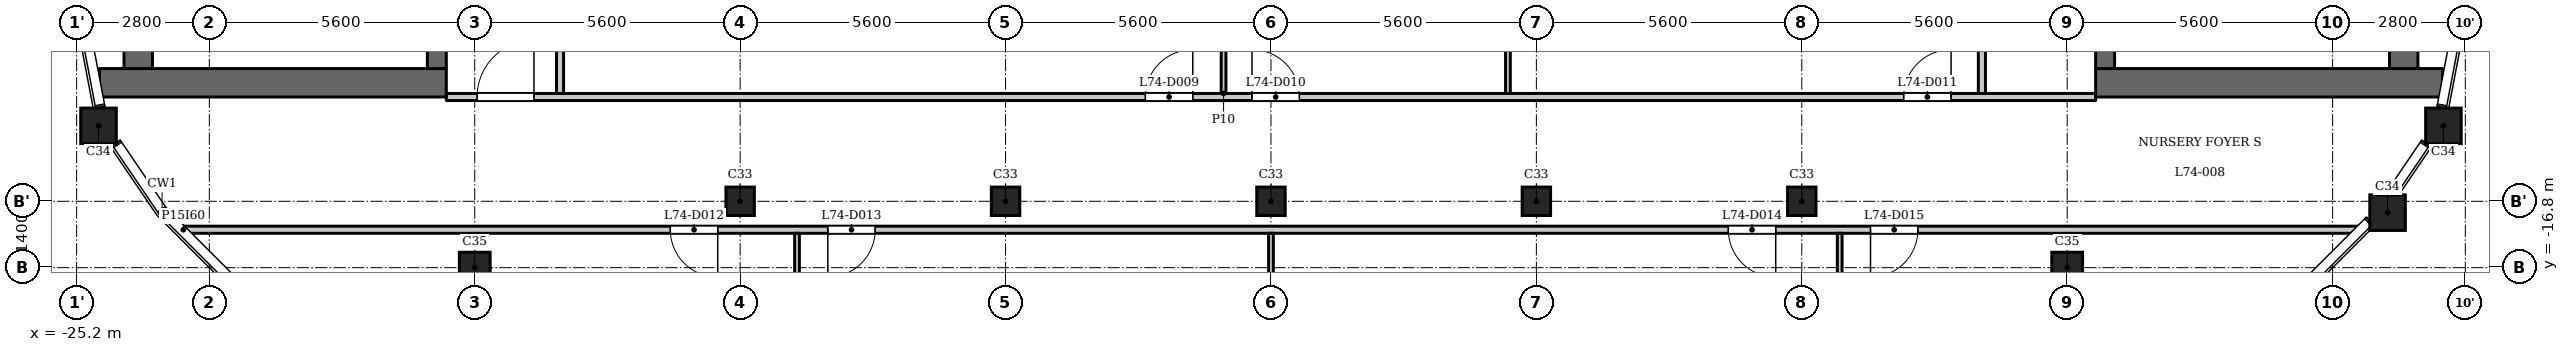
"""IFC4 building model, lengths in metres.
Left out: names, types, materials, properties, quantities, classifications, styles, units other than length and angle.
Written with IfcOpenShell. Run it as: python <this file> out.ifc"""

import sys

from ifc_helpers import new_model, si_unit, direction, frame, frame_2d, origin, origin_2d, place, context, subcontext, project, spatial, rectangle, extrude, element, fill, save


model = new_model("IFC4")
c1 = context("Model", 3, precision=1e-05, world=origin(), true_north=direction((0.0, 1.0)))
c2 = subcontext(c1, "Body", "Model", "MODEL_VIEW")
j1 = project(units=[si_unit("LENGTHUNIT", "METRE"), si_unit("PLANEANGLEUNIT", "RADIAN")], contexts=[c1])
p1 = place(None, origin())
s1 = spatial("IfcSite", under=j1, at=p1, CompositionType="ELEMENT")
p2 = place(p1, origin())
s2 = spatial("IfcBuilding", under=s1, at=p2, CompositionType="ELEMENT")
p3 = place(p2, frame((0.0, 0.0, 283.7)))
s3 = spatial("IfcBuildingStorey", under=s2, at=p3, CompositionType="ELEMENT", Elevation=283.7)
for number, where, z_axis, x_axis in (
    (1, (23.56, -15.64, 0.0), (0.0, 0.0, 1.0), (1.0, 0.0, 0.0)),
    (2, (24.738, -13.809, 0.0), (0.0, 0.0, 1.0), (1.0, 0.0, 0.0)),
    (3, (-24.738, -13.809, 0.0), (0.0, 0.0, 1.0), (1.0, 0.0, 0.0)),
):
    element("IfcColumn", number, at=place(p3, frame(where, z_axis=z_axis, x_axis=x_axis)), inside=s3, PredefinedType="COLUMN", context=c2, shape_type="SweptSolid", body=[
        extrude(rectangle(XDim=0.75, YDim=0.75, at=origin_2d()), origin(), (0.0, 0.0, 1.0), 5.4),
    ])
for number, where, z_axis, x_axis in (
    (4, (-16.8, -16.8, 0.0), (0.0, 0.0, 1.0), (1.0, 0.0, 0.0)),
    (5, (16.8, -16.8, 0.0), (0.0, 0.0, 1.0), (1.0, 0.0, 0.0)),
):
    element("IfcColumn", number, at=place(p3, frame(where, z_axis=z_axis, x_axis=x_axis)), inside=s3, PredefinedType="COLUMN", context=c2, shape_type="SweptSolid", body=[
        extrude(rectangle(XDim=0.65, YDim=0.65, at=origin_2d()), origin(), (0.0, 0.0, 1.0), 5.4),
    ])
for number, where, z_axis, x_axis in (
    (6, (-11.2, -15.4, 0.0), (0.0, 0.0, 1.0), (1.0, 0.0, 0.0)),
    (7, (-5.6, -15.4, 0.0), (0.0, 0.0, 1.0), (1.0, 0.0, 0.0)),
    (8, (0.0, -15.4, 0.0), (0.0, 0.0, 1.0), (1.0, 0.0, 0.0)),
    (9, (5.6, -15.4, 0.0), (0.0, 0.0, 1.0), (1.0, 0.0, 0.0)),
    (10, (11.2, -15.4, 0.0), (0.0, 0.0, 1.0), (1.0, 0.0, 0.0)),
):
    element("IfcColumn", number, at=place(p3, frame(where, z_axis=z_axis, x_axis=x_axis)), inside=s3, PredefinedType="COLUMN", context=c2, shape_type="SweptSolid", body=[
        extrude(rectangle(XDim=0.6, YDim=0.6, at=origin_2d()), origin(), (0.0, 0.0, 1.0), 5.4),
    ])
p4 = place(p3, frame((-17.4, -12.9, 0.0), z_axis=(0.0, 0.0, 1.0), x_axis=(-1.0, 0.0, 0.0)))
e11 = element("IfcWall", 11, at=p4, inside=s3, PredefinedType="SHEAR", context=c2, shape_type="SweptSolid", body=[
    extrude(rectangle(XDim=7.32, YDim=0.6, at=frame_2d((3.66, 0.0))), origin(), (0.0, 0.0, 1.0), 4.95),
])
p5 = place(p3, frame((-17.6, -12.6, 0.0), z_axis=(0.0, 0.0, 1.0), x_axis=(0.0, 1.0, 0.0)))
e12 = element("IfcWall", 12, at=p5, inside=s3, PredefinedType="SHEAR", context=c2, shape_type="SweptSolid", body=[
    extrude(rectangle(XDim=25.2, YDim=0.4, at=frame_2d((12.6, 0.0))), origin(), (0.0, 0.0, 1.0), 4.95),
])
p6 = place(p5, frame((6.3, 0.0, 0.0)))
e13 = element("IfcOpeningElement", 13, at=p6, cuts=e12, PredefinedType="OPENING", context=c2, shape_type="SweptSolid", body=[
    extrude(rectangle(XDim=1.1, YDim=2.1, at=frame_2d((0.55, 1.05))), frame((0.0, 0.21, 0.0), z_axis=(0.0, -1.0, 0.0), x_axis=(1.0, 0.0, 0.0)), (0.0, 0.0, 1.0), 0.42),
])
p7 = place(p5, frame((8.7, 0.0, 0.0)))
e14 = element("IfcOpeningElement", 14, at=p7, cuts=e12, PredefinedType="OPENING", context=c2, shape_type="SweptSolid", body=[
    extrude(rectangle(XDim=1.1, YDim=2.1, at=frame_2d((0.55, 1.05))), frame((0.0, 0.21, 0.0), z_axis=(0.0, -1.0, 0.0), x_axis=(1.0, 0.0, 0.0)), (0.0, 0.0, 1.0), 0.42),
])
p8 = place(p5, frame((11.2, 0.0, 0.0)))
e15 = element("IfcOpeningElement", 15, at=p8, cuts=e12, PredefinedType="OPENING", context=c2, shape_type="SweptSolid", body=[
    extrude(rectangle(XDim=0.9, YDim=2.1, at=frame_2d((0.45, 1.05))), frame((0.0, 0.21, 0.0), z_axis=(0.0, -1.0, 0.0), x_axis=(1.0, 0.0, 0.0)), (0.0, 0.0, 1.0), 0.42),
])
p9 = place(p5, frame((17.05, 0.0, 0.0)))
e16 = element("IfcOpeningElement", 16, at=p9, cuts=e12, PredefinedType="OPENING", context=c2, shape_type="SweptSolid", body=[
    extrude(rectangle(XDim=0.9, YDim=2.1, at=frame_2d((0.45, 1.05))), frame((0.0, 0.21, 0.0), z_axis=(0.0, -1.0, 0.0), x_axis=(1.0, 0.0, 0.0)), (0.0, 0.0, 1.0), 0.42),
])
p10 = place(p5, frame((23.25, 0.0, 0.0)))
e17 = element("IfcOpeningElement", 17, at=p10, cuts=e12, PredefinedType="OPENING", context=c2, shape_type="SweptSolid", body=[
    extrude(rectangle(XDim=1.1, YDim=2.1, at=frame_2d((0.55, 1.05))), frame((0.0, 0.21, 0.0), z_axis=(0.0, -1.0, 0.0), x_axis=(1.0, 0.0, 0.0)), (0.0, 0.0, 1.0), 0.42),
])
p11 = place(p5, frame((0.85, 0.0, 0.0)))
e18 = element("IfcOpeningElement", 18, at=p11, cuts=e12, PredefinedType="OPENING", context=c2, shape_type="SweptSolid", body=[
    extrude(rectangle(XDim=1.1, YDim=2.1, at=frame_2d((0.55, 1.05))), frame((0.0, 0.21, 0.0), z_axis=(0.0, -1.0, 0.0), x_axis=(1.0, 0.0, 0.0)), (0.0, 0.0, 1.0), 0.42),
])
p12 = place(p5, frame((13.075, 0.0, 0.0)))
e19 = element("IfcOpeningElement", 19, at=p12, cuts=e12, PredefinedType="OPENING", context=c2, shape_type="SweptSolid", body=[
    extrude(rectangle(XDim=1.8, YDim=2.1, at=frame_2d((0.9, 1.05))), frame((0.0, 0.21, 0.0), z_axis=(0.0, -1.0, 0.0), x_axis=(1.0, 0.0, 0.0)), (0.0, 0.0, 1.0), 0.42),
])
p13 = place(p3, frame((-23.9, -12.6, 0.0), z_axis=(0.0, 0.0, 1.0), x_axis=(0.0, 1.0, 0.0)))
e20 = element("IfcWall", 20, at=p13, inside=s3, PredefinedType="SHEAR", context=c2, shape_type="SweptSolid", body=[
    extrude(rectangle(XDim=25.2, YDim=0.6, at=frame_2d((12.6, 0.0))), origin(), (0.0, 0.0, 1.0), 4.95),
])
p14 = place(p3, frame((17.4, -12.9, 0.0), z_axis=(0.0, 0.0, 1.0), x_axis=(1.0, 0.0, 0.0)))
e21 = element("IfcWall", 21, at=p14, inside=s3, PredefinedType="SHEAR", context=c2, shape_type="SweptSolid", body=[
    extrude(rectangle(XDim=7.32, YDim=0.6, at=frame_2d((3.66, 0.0))), origin(), (0.0, 0.0, 1.0), 4.95),
])
p15 = place(p3, frame((17.6, -12.6, 0.0), z_axis=(0.0, 0.0, 1.0), x_axis=(0.0, 1.0, 0.0)))
e22 = element("IfcWall", 22, at=p15, inside=s3, PredefinedType="SHEAR", context=c2, shape_type="SweptSolid", body=[
    extrude(rectangle(XDim=25.2, YDim=0.4, at=frame_2d((12.6, 0.0))), origin(), (0.0, 0.0, 1.0), 4.95),
])
p16 = place(p15, frame((6.3, 0.0, 0.0)))
e23 = element("IfcOpeningElement", 23, at=p16, cuts=e22, PredefinedType="OPENING", context=c2, shape_type="SweptSolid", body=[
    extrude(rectangle(XDim=1.1, YDim=2.1, at=frame_2d((0.55, 1.05))), frame((0.0, 0.21, 0.0), z_axis=(0.0, -1.0, 0.0), x_axis=(1.0, 0.0, 0.0)), (0.0, 0.0, 1.0), 0.42),
])
p17 = place(p15, frame((8.7, 0.0, 0.0)))
e24 = element("IfcOpeningElement", 24, at=p17, cuts=e22, PredefinedType="OPENING", context=c2, shape_type="SweptSolid", body=[
    extrude(rectangle(XDim=1.1, YDim=2.1, at=frame_2d((0.55, 1.05))), frame((0.0, 0.21, 0.0), z_axis=(0.0, -1.0, 0.0), x_axis=(1.0, 0.0, 0.0)), (0.0, 0.0, 1.0), 0.42),
])
p18 = place(p15, frame((11.2, 0.0, 0.0)))
e25 = element("IfcOpeningElement", 25, at=p18, cuts=e22, PredefinedType="OPENING", context=c2, shape_type="SweptSolid", body=[
    extrude(rectangle(XDim=0.9, YDim=2.1, at=frame_2d((0.45, 1.05))), frame((0.0, 0.21, 0.0), z_axis=(0.0, -1.0, 0.0), x_axis=(1.0, 0.0, 0.0)), (0.0, 0.0, 1.0), 0.42),
])
p19 = place(p15, frame((17.05, 0.0, 0.0)))
e26 = element("IfcOpeningElement", 26, at=p19, cuts=e22, PredefinedType="OPENING", context=c2, shape_type="SweptSolid", body=[
    extrude(rectangle(XDim=0.9, YDim=2.1, at=frame_2d((0.45, 1.05))), frame((0.0, 0.21, 0.0), z_axis=(0.0, -1.0, 0.0), x_axis=(1.0, 0.0, 0.0)), (0.0, 0.0, 1.0), 0.42),
])
p20 = place(p15, frame((23.25, 0.0, 0.0)))
e27 = element("IfcOpeningElement", 27, at=p20, cuts=e22, PredefinedType="OPENING", context=c2, shape_type="SweptSolid", body=[
    extrude(rectangle(XDim=1.1, YDim=2.1, at=frame_2d((0.55, 1.05))), frame((0.0, 0.21, 0.0), z_axis=(0.0, -1.0, 0.0), x_axis=(1.0, 0.0, 0.0)), (0.0, 0.0, 1.0), 0.42),
])
p21 = place(p15, frame((0.85, 0.0, 0.0)))
e28 = element("IfcOpeningElement", 28, at=p21, cuts=e22, PredefinedType="OPENING", context=c2, shape_type="SweptSolid", body=[
    extrude(rectangle(XDim=1.1, YDim=2.1, at=frame_2d((0.55, 1.05))), frame((0.0, 0.21, 0.0), z_axis=(0.0, -1.0, 0.0), x_axis=(1.0, 0.0, 0.0)), (0.0, 0.0, 1.0), 0.42),
])
p22 = place(p15, frame((13.075, 0.0, 0.0)))
e29 = element("IfcOpeningElement", 29, at=p22, cuts=e22, PredefinedType="OPENING", context=c2, shape_type="SweptSolid", body=[
    extrude(rectangle(XDim=1.8, YDim=2.1, at=frame_2d((0.9, 1.05))), frame((0.0, 0.21, 0.0), z_axis=(0.0, -1.0, 0.0), x_axis=(1.0, 0.0, 0.0)), (0.0, 0.0, 1.0), 0.42),
])
p23 = place(p3, frame((23.9, -12.6, 0.0), z_axis=(0.0, 0.0, 1.0), x_axis=(0.0, 1.0, 0.0)))
e30 = element("IfcWall", 30, at=p23, inside=s3, PredefinedType="SHEAR", context=c2, shape_type="SweptSolid", body=[
    extrude(rectangle(XDim=25.2, YDim=0.6, at=frame_2d((12.6, 0.0))), origin(), (0.0, 0.0, 1.0), 4.95),
])
p24 = place(p3, frame((-22.948, -16.0, 0.0), z_axis=(0.0, 0.0, 1.0), x_axis=(1.0, 0.0, 0.0)))
e31 = element("IfcWall", 31, at=p24, inside=s3, PredefinedType="PARTITIONING", context=c2, shape_type="SweptSolid", body=[
    extrude(rectangle(XDim=45.896, YDim=0.15, at=frame_2d((22.948, 0.0))), origin(), (0.0, 0.0, 1.0), 4.95),
])
p25 = place(p24, frame((10.275, 0.0, 0.0)))
e32 = element("IfcOpeningElement", 32, at=p25, cuts=e31, PredefinedType="OPENING", context=c2, shape_type="SweptSolid", body=[
    extrude(rectangle(XDim=1.0, YDim=2.1, at=frame_2d((0.5, 1.05))), frame((0.0, 0.085, 0.0), z_axis=(0.0, -1.0, 0.0), x_axis=(1.0, 0.0, 0.0)), (0.0, 0.0, 1.0), 0.17),
])
p26 = place(p24, frame((13.598, 0.0, 0.0)))
e33 = element("IfcOpeningElement", 33, at=p26, cuts=e31, PredefinedType="OPENING", context=c2, shape_type="SweptSolid", body=[
    extrude(rectangle(XDim=1.0, YDim=2.1, at=frame_2d((0.5, 1.05))), frame((0.0, 0.085, 0.0), z_axis=(0.0, -1.0, 0.0), x_axis=(1.0, 0.0, 0.0)), (0.0, 0.0, 1.0), 0.17),
])
p27 = place(p24, frame((32.598, 0.0, 0.0)))
e34 = element("IfcOpeningElement", 34, at=p27, cuts=e31, PredefinedType="OPENING", context=c2, shape_type="SweptSolid", body=[
    extrude(rectangle(XDim=1.0, YDim=2.1, at=frame_2d((0.5, 1.05))), frame((0.0, 0.085, 0.0), z_axis=(0.0, -1.0, 0.0), x_axis=(1.0, 0.0, 0.0)), (0.0, 0.0, 1.0), 0.17),
])
p28 = place(p24, frame((35.598, 0.0, 0.0)))
e35 = element("IfcOpeningElement", 35, at=p28, cuts=e31, PredefinedType="OPENING", context=c2, shape_type="SweptSolid", body=[
    extrude(rectangle(XDim=1.0, YDim=2.1, at=frame_2d((0.5, 1.05))), frame((0.0, 0.085, 0.0), z_axis=(0.0, -1.0, 0.0), x_axis=(1.0, 0.0, 0.0)), (0.0, 0.0, 1.0), 0.17),
])
p29 = place(p3, frame((-17.4, -13.2, 0.0), z_axis=(0.0, 0.0, 1.0), x_axis=(1.0, 0.0, 0.0)))
e36 = element("IfcWall", 36, at=p29, inside=s3, PredefinedType="PARTITIONING", context=c2, shape_type="SweptSolid", body=[
    extrude(rectangle(XDim=34.8, YDim=0.15, at=frame_2d((17.4, 0.0))), origin(), (0.0, 0.0, 1.0), 4.95),
])
p30 = place(p29, frame((0.65, 0.0, 0.0)))
e37 = element("IfcOpeningElement", 37, at=p30, cuts=e36, PredefinedType="OPENING", context=c2, shape_type="SweptSolid", body=[
    extrude(rectangle(XDim=1.2, YDim=2.1, at=frame_2d((0.6, 1.05))), frame((0.0, 0.085, 0.0), z_axis=(0.0, -1.0, 0.0), x_axis=(1.0, 0.0, 0.0)), (0.0, 0.0, 1.0), 0.17),
])
p31 = place(p29, frame((14.75, 0.0, 0.0)))
e38 = element("IfcOpeningElement", 38, at=p31, cuts=e36, PredefinedType="OPENING", context=c2, shape_type="SweptSolid", body=[
    extrude(rectangle(XDim=1.0, YDim=2.1, at=frame_2d((0.5, 1.05))), frame((0.0, 0.085, 0.0), z_axis=(0.0, -1.0, 0.0), x_axis=(1.0, 0.0, 0.0)), (0.0, 0.0, 1.0), 0.17),
])
p32 = place(p29, frame((17.0, 0.0, 0.0)))
e39 = element("IfcOpeningElement", 39, at=p32, cuts=e36, PredefinedType="OPENING", context=c2, shape_type="SweptSolid", body=[
    extrude(rectangle(XDim=1.0, YDim=2.1, at=frame_2d((0.5, 1.05))), frame((0.0, 0.085, 0.0), z_axis=(0.0, -1.0, 0.0), x_axis=(1.0, 0.0, 0.0)), (0.0, 0.0, 1.0), 0.17),
])
p33 = place(p29, frame((30.75, 0.0, 0.0)))
e40 = element("IfcOpeningElement", 40, at=p33, cuts=e36, PredefinedType="OPENING", context=c2, shape_type="SweptSolid", body=[
    extrude(rectangle(XDim=1.0, YDim=2.1, at=frame_2d((0.5, 1.05))), frame((0.0, 0.085, 0.0), z_axis=(0.0, -1.0, 0.0), x_axis=(1.0, 0.0, 0.0)), (0.0, 0.0, 1.0), 0.17),
])
p34 = place(p3, frame((-15.0, -13.125, 0.0), z_axis=(0.0, 0.0, 1.0), x_axis=(0.0, 1.0, 0.0)))
e41 = element("IfcWall", 41, at=p34, inside=s3, PredefinedType="PARTITIONING", context=c2, shape_type="SweptSolid", body=[
    extrude(rectangle(XDim=6.356, YDim=0.15, at=frame_2d((3.178, 0.0))), origin(), (0.0, 0.0, 1.0), 4.95),
])
p35 = place(p3, frame((-10.0, -19.416, 0.0), z_axis=(0.0, 0.0, 1.0), x_axis=(0.0, 1.0, 0.0)))
e42 = element("IfcWall", 42, at=p35, inside=s3, PredefinedType="PARTITIONING", context=c2, shape_type="SweptSolid", body=[
    extrude(rectangle(XDim=3.341, YDim=0.1, at=frame_2d((1.67, 0.0))), origin(), (0.0, 0.0, 1.0), 4.95),
])
p36 = place(p3, frame((-1.0, -13.125, 0.0), z_axis=(0.0, 0.0, 1.0), x_axis=(0.0, 1.0, 0.0)))
e43 = element("IfcWall", 43, at=p36, inside=s3, PredefinedType="PARTITIONING", context=c2, shape_type="SweptSolid", body=[
    extrude(rectangle(XDim=5.943, YDim=0.1, at=frame_2d((2.972, 0.0))), origin(), (0.0, 0.0, 1.0), 4.95),
])
p37 = place(p3, frame((0.0, -19.35, 0.0), z_axis=(0.0, 0.0, 1.0), x_axis=(0.0, 1.0, 0.0)))
e44 = element("IfcWall", 44, at=p37, inside=s3, PredefinedType="PARTITIONING", context=c2, shape_type="SweptSolid", body=[
    extrude(rectangle(XDim=3.275, YDim=0.1, at=frame_2d((1.638, 0.0))), origin(), (0.0, 0.0, 1.0), 4.95),
])
p38 = place(p3, frame((5.0, -13.125, 0.0), z_axis=(0.0, 0.0, 1.0), x_axis=(0.0, 1.0, 0.0)))
e45 = element("IfcWall", 45, at=p38, inside=s3, PredefinedType="PARTITIONING", context=c2, shape_type="SweptSolid", body=[
    extrude(rectangle(XDim=5.943, YDim=0.1, at=frame_2d((2.972, 0.0))), origin(), (0.0, 0.0, 1.0), 4.95),
])
p39 = place(p3, frame((12.0, -19.416, 0.0), z_axis=(0.0, 0.0, 1.0), x_axis=(0.0, 1.0, 0.0)))
e46 = element("IfcWall", 46, at=p39, inside=s3, PredefinedType="PARTITIONING", context=c2, shape_type="SweptSolid", body=[
    extrude(rectangle(XDim=3.341, YDim=0.1, at=frame_2d((1.67, 0.0))), origin(), (0.0, 0.0, 1.0), 4.95),
])
p40 = place(p3, frame((15.0, -13.125, 0.0), z_axis=(0.0, 0.0, 1.0), x_axis=(0.0, 1.0, 0.0)))
e47 = element("IfcWall", 47, at=p40, inside=s3, PredefinedType="PARTITIONING", context=c2, shape_type="SweptSolid", body=[
    extrude(rectangle(XDim=6.356, YDim=0.15, at=frame_2d((3.178, 0.0))), origin(), (0.0, 0.0, 1.0), 4.95),
])
p41 = place(p30, origin())
e48 = element("IfcDoor", 48, at=p41, inside=s3, OperationType="SINGLE_SWING_LEFT", PredefinedType="DOOR", context=c2, shape_type="SweptSolid", body=[
    extrude(rectangle(XDim=1.2, YDim=2.1, at=frame_2d((0.6, 1.05))), frame((0.0, 0.025, 0.0), z_axis=(0.0, -1.0, 0.0), x_axis=(1.0, 0.0, 0.0)), (0.0, 0.0, 1.0), 0.05),
])
fill(e37, e48)
p42 = place(p31, origin())
e49 = element("IfcDoor", 49, at=p42, inside=s3, OperationType="SINGLE_SWING_LEFT", PredefinedType="DOOR", context=c2, shape_type="SweptSolid", body=[
    extrude(rectangle(XDim=1.0, YDim=2.1, at=frame_2d((0.5, 1.05))), frame((0.0, 0.025, 0.0), z_axis=(0.0, -1.0, 0.0), x_axis=(1.0, 0.0, 0.0)), (0.0, 0.0, 1.0), 0.05),
])
fill(e38, e49)
p43 = place(p32, origin())
e50 = element("IfcDoor", 50, at=p43, inside=s3, OperationType="SINGLE_SWING_RIGHT", PredefinedType="DOOR", context=c2, shape_type="SweptSolid", body=[
    extrude(rectangle(XDim=1.0, YDim=2.1, at=frame_2d((0.5, 1.05))), frame((0.0, 0.025, 0.0), z_axis=(0.0, -1.0, 0.0), x_axis=(1.0, 0.0, 0.0)), (0.0, 0.0, 1.0), 0.05),
])
fill(e39, e50)
p44 = place(p33, origin())
e51 = element("IfcDoor", 51, at=p44, inside=s3, OperationType="SINGLE_SWING_LEFT", PredefinedType="DOOR", context=c2, shape_type="SweptSolid", body=[
    extrude(rectangle(XDim=1.0, YDim=2.1, at=frame_2d((0.5, 1.05))), frame((0.0, 0.025, 0.0), z_axis=(0.0, -1.0, 0.0), x_axis=(1.0, 0.0, 0.0)), (0.0, 0.0, 1.0), 0.05),
])
fill(e40, e51)
p45 = place(p25, origin())
e52 = element("IfcDoor", 52, at=p45, inside=s3, OperationType="SINGLE_SWING_RIGHT", PredefinedType="DOOR", context=c2, shape_type="SweptSolid", body=[
    extrude(rectangle(XDim=1.0, YDim=2.1, at=frame_2d((0.5, 1.05))), frame((0.0, 0.025, 0.0), z_axis=(0.0, -1.0, 0.0), x_axis=(1.0, 0.0, 0.0)), (0.0, 0.0, 1.0), 0.05),
])
fill(e32, e52)
p46 = place(p26, origin())
e53 = element("IfcDoor", 53, at=p46, inside=s3, OperationType="SINGLE_SWING_LEFT", PredefinedType="DOOR", context=c2, shape_type="SweptSolid", body=[
    extrude(rectangle(XDim=1.0, YDim=2.1, at=frame_2d((0.5, 1.05))), frame((0.0, 0.025, 0.0), z_axis=(0.0, -1.0, 0.0), x_axis=(1.0, 0.0, 0.0)), (0.0, 0.0, 1.0), 0.05),
])
fill(e33, e53)
p47 = place(p27, origin())
e54 = element("IfcDoor", 54, at=p47, inside=s3, OperationType="SINGLE_SWING_RIGHT", PredefinedType="DOOR", context=c2, shape_type="SweptSolid", body=[
    extrude(rectangle(XDim=1.0, YDim=2.1, at=frame_2d((0.5, 1.05))), frame((0.0, 0.025, 0.0), z_axis=(0.0, -1.0, 0.0), x_axis=(1.0, 0.0, 0.0)), (0.0, 0.0, 1.0), 0.05),
])
fill(e34, e54)
p48 = place(p28, origin())
e55 = element("IfcDoor", 55, at=p48, inside=s3, OperationType="SINGLE_SWING_LEFT", PredefinedType="DOOR", context=c2, shape_type="SweptSolid", body=[
    extrude(rectangle(XDim=1.0, YDim=2.1, at=frame_2d((0.5, 1.05))), frame((0.0, 0.025, 0.0), z_axis=(0.0, -1.0, 0.0), x_axis=(1.0, 0.0, 0.0)), (0.0, 0.0, 1.0), 0.05),
])
fill(e35, e55)
save(model, sys.argv[1])
